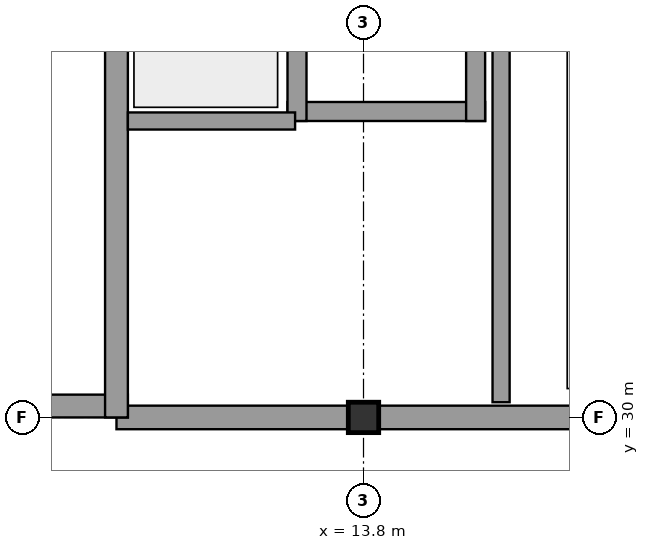
"""IFC4 building model, lengths in metres.
Left out: names, types, materials, properties, quantities, classifications, styles, units other than length and angle.
Written with IfcOpenShell. Run it as: python <this file> out.ifc"""

import sys

from ifc_helpers import new_model, si_unit, direction, frame, frame_2d, origin, origin_with_axes, origin_2d, place, context, subcontext, project, spatial, rectangle, extrude, element, fill, save


model = new_model("IFC4")
c1 = context("Model", 3, precision=1e-05, world=origin(), true_north=direction((0.0, 1.0)))
c2 = subcontext(c1, "Body", "Model", "MODEL_VIEW")
j1 = project(units=[si_unit("LENGTHUNIT", "METRE"), si_unit("PLANEANGLEUNIT", "RADIAN")], contexts=[c1])
p1 = place(None, origin())
s1 = spatial("IfcSite", under=j1, at=p1, CompositionType="ELEMENT")
p2 = place(p1, origin())
s2 = spatial("IfcBuilding", under=s1, at=p2, CompositionType="ELEMENT")
p3 = place(p2, origin())
s3 = spatial("IfcBuildingStorey", under=s2, at=p3, CompositionType="ELEMENT", Elevation=0.0)
p4 = place(p3, frame((13.8, 30.0, 0.0), z_axis=(0.0, 0.0, 1.0), x_axis=(1.0, 0.0, 0.0)))
e1 = element("IfcColumn", 1, at=p4, inside=s3, PredefinedType="COLUMN", context=c2, shape_type="SweptSolid", body=[
    extrude(rectangle(XDim=0.4, YDim=0.4, at=origin_2d()), origin(), (0.0, 0.0, 1.0), 4.4),
])
p5 = place(p3, frame((10.55, 30.0, 0.0), z_axis=(0.0, 0.0, 1.0), x_axis=(1.0, 0.0, 0.0)))
e2 = element("IfcWall", 2, at=p5, inside=s3, PredefinedType="STANDARD", context=c2, shape_type="SweptSolid", body=[
    extrude(rectangle(XDim=10.15, YDim=0.31, at=frame_2d((5.075, 0.0))), origin(), (0.0, 0.0, 1.0), 3.36),
])
p6 = place(p5, frame((6.5, 0.0, 0.9)))
e3 = element("IfcOpeningElement", 3, at=p6, cuts=e2, PredefinedType="OPENING", context=c2, shape_type="SweptSolid", body=[
    extrude(rectangle(XDim=2.2, YDim=1.35, at=frame_2d((1.1, 0.675))), frame((0.0, 0.167, 0.0), z_axis=(0.0, -1.0, 0.0), x_axis=(1.0, 0.0, 0.0)), (0.0, 0.0, 1.0), 0.334),
])
p7 = place(p3, frame((7.2, 30.15, 0.0), z_axis=(0.0, 0.0, 1.0), x_axis=(1.0, 0.0, 0.0)))
e4 = element("IfcWall", 4, at=p7, inside=s3, PredefinedType="SHEAR", context=c2, shape_type="SweptSolid", body=[
    extrude(rectangle(XDim=3.5, YDim=0.3, at=frame_2d((1.75, 0.0))), origin(), (0.0, 0.0, 1.0), 4.12),
])
p8 = place(p7, frame((1.05, 0.0, 0.0)))
e5 = element("IfcOpeningElement", 5, at=p8, cuts=e4, PredefinedType="OPENING", context=c2, shape_type="SweptSolid", body=[
    extrude(rectangle(XDim=1.4, YDim=2.25, at=frame_2d((0.7, 1.125))), frame((0.0, 0.162, 0.0), z_axis=(0.0, -1.0, 0.0), x_axis=(1.0, 0.0, 0.0)), (0.0, 0.0, 1.0), 0.324),
])
p9 = place(p3, frame((10.55, 30.0, 0.0), z_axis=(0.0, 0.0, 1.0), x_axis=(0.0, 1.0, 0.0)))
e6 = element("IfcWall", 6, at=p9, inside=s3, PredefinedType="SHEAR", context=c2, shape_type="SweptSolid", body=[
    extrude(rectangle(XDim=7.5, YDim=0.3, at=frame_2d((3.75, 0.0))), origin(), (0.0, 0.0, 1.0), 4.12),
])
p10 = place(p9, frame((0.65, 0.0, 0.0)))
e7 = element("IfcOpeningElement", 7, at=p10, cuts=e6, PredefinedType="OPENING", context=c2, shape_type="SweptSolid", body=[
    extrude(rectangle(XDim=1.15, YDim=2.15, at=frame_2d((0.575, 1.075))), frame((0.0, 0.162, 0.0), z_axis=(0.0, -1.0, 0.0), x_axis=(1.0, 0.0, 0.0)), (0.0, 0.0, 1.0), 0.324),
])
p11 = place(p3, frame((12.8, 34.025, 0.0), z_axis=(0.0, 0.0, 1.0), x_axis=(1.0, 0.0, 0.0)))
e8 = element("IfcWall", 8, at=p11, inside=s3, PredefinedType="SHEAR", context=c2, shape_type="SweptSolid", body=[
    extrude(rectangle(XDim=2.6, YDim=0.25, at=frame_2d((1.3, 0.0))), origin(), (0.0, 0.0, 1.0), 4.12),
])
p12 = place(p11, frame((0.925, 0.0, 0.0)))
e9 = element("IfcOpeningElement", 9, at=p12, cuts=e8, PredefinedType="OPENING", context=c2, shape_type="SweptSolid", body=[
    extrude(rectangle(XDim=1.0, YDim=2.1, at=frame_2d((0.5, 1.05))), frame((0.0, 0.137, 0.0), z_axis=(0.0, -1.0, 0.0), x_axis=(1.0, 0.0, 0.0)), (0.0, 0.0, 1.0), 0.274),
])
for number, where, z_axis, x_axis in (
    (10, (12.925, 33.9, 0.0), (0.0, 0.0, 1.0), (0.0, 1.0, 0.0)),
    (11, (15.275, 33.9, 0.0), (0.0, 0.0, 1.0), (0.0, 1.0, 0.0)),
):
    element("IfcWall", number, at=place(p3, frame(where, z_axis=z_axis, x_axis=x_axis)), inside=s3, PredefinedType="SHEAR", context=c2, shape_type="SweptSolid", body=[
        extrude(rectangle(XDim=3.25, YDim=0.25, at=frame_2d((1.625, 0.0))), origin(), (0.0, 0.0, 1.0), 4.12),
    ])
p13 = place(p3, frame((15.61, 30.2, 0.0), z_axis=(0.0, 0.0, 1.0), x_axis=(0.0, 1.0, 0.0)))
e12 = element("IfcWall", 12, at=p13, inside=s3, PredefinedType="PARTITIONING", context=c2, shape_type="SweptSolid", body=[
    extrude(rectangle(XDim=7.6, YDim=0.225, at=frame_2d((3.8, 0.0))), origin(), (0.0, 0.0, 1.0), 4.12),
])
p14 = place(p3, frame((10.7, 33.9, 0.0), z_axis=(0.0, 0.0, 1.0), x_axis=(1.0, 0.0, 0.0)))
e13 = element("IfcWall", 13, at=p14, inside=s3, PredefinedType="PARTITIONING", context=c2, shape_type="SweptSolid", body=[
    extrude(rectangle(XDim=2.2, YDim=0.225, at=frame_2d((1.1, 0.0))), origin(), (0.0, 0.0, 1.0), 4.12),
])
p15 = place(p14, frame((0.45, 0.0, 0.0)))
e14 = element("IfcOpeningElement", 14, at=p15, cuts=e13, PredefinedType="OPENING", context=c2, shape_type="SweptSolid", body=[
    extrude(rectangle(XDim=1.1, YDim=2.15, at=frame_2d((0.55, 1.075))), frame((0.0, 0.125, 0.0), z_axis=(0.0, -1.0, 0.0), x_axis=(1.0, 0.0, 0.0)), (0.0, 0.0, 1.0), 0.249),
])
p16 = place(p10, origin_with_axes())
e15 = element("IfcDoor", 15, at=p16, inside=s3, OperationType="SINGLE_SWING_RIGHT", PredefinedType="DOOR", context=c2, shape_type="SweptSolid", body=[
    extrude(rectangle(XDim=1.15, YDim=2.15, at=frame_2d((0.575, 1.075))), frame((0.0, 0.025, 0.0), z_axis=(0.0, -1.0, 0.0), x_axis=(1.0, 0.0, 0.0)), (0.0, 0.0, 1.0), 0.05),
])
fill(e7, e15)
p17 = place(p12, origin_with_axes())
e16 = element("IfcDoor", 16, at=p17, inside=s3, OperationType="SLIDING_TO_LEFT", PredefinedType="DOOR", context=c2, shape_type="SweptSolid", body=[
    extrude(rectangle(XDim=1.0, YDim=2.1, at=frame_2d((0.5, 1.05))), frame((0.0, 0.025, 0.0), z_axis=(0.0, -1.0, 0.0), x_axis=(1.0, 0.0, 0.0)), (0.0, 0.0, 1.0), 0.05),
])
fill(e9, e16)
p18 = place(p15, frame((1.1, 0.0, 0.0), z_axis=(0.0, 0.0, 1.0), x_axis=(-1.0, 0.0, 0.0)))
e17 = element("IfcDoor", 17, at=p18, inside=s3, OperationType="SINGLE_SWING_RIGHT", PredefinedType="DOOR", context=c2, shape_type="SweptSolid", body=[
    extrude(rectangle(XDim=1.1, YDim=2.15, at=frame_2d((0.55, 1.075))), frame((0.0, 0.025, 0.0), z_axis=(0.0, -1.0, 0.0), x_axis=(1.0, 0.0, 0.0)), (0.0, 0.0, 1.0), 0.05),
])
fill(e14, e17)
save(model, sys.argv[1])
